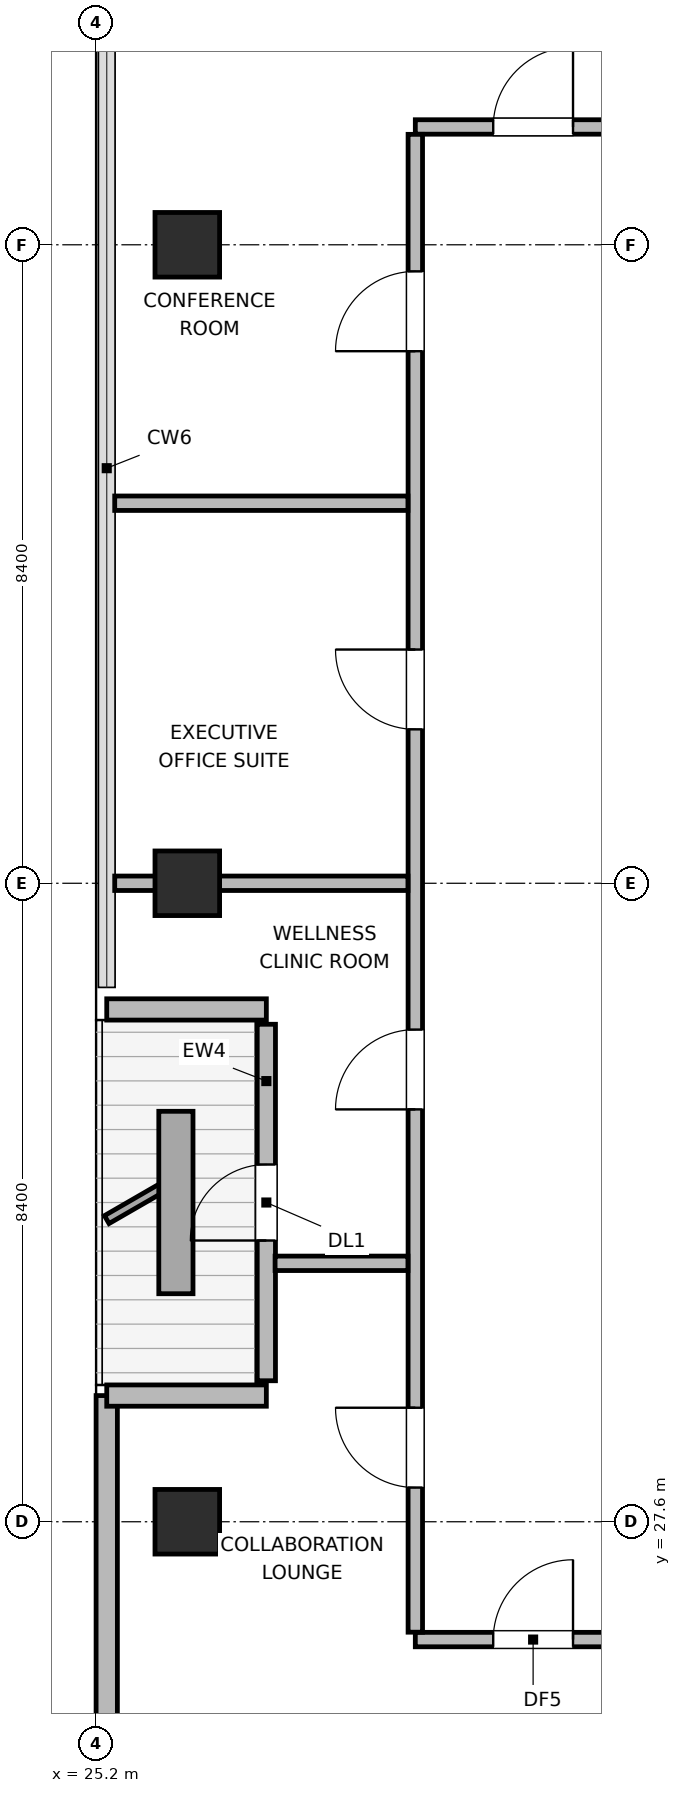
"""IFC4 building model, lengths in metres.
Left out: names, types, materials, properties, quantities, classifications, styles, units other than length and angle.
Written with IfcOpenShell. Run it as: python <this file> out.ifc"""

import sys

from ifc_helpers import new_model, si_unit, direction, frame, frame_2d, origin, origin_2d, place, context, subcontext, project, spatial, rectangle, extrude, element, fill, save


model = new_model("IFC4")
c1 = context("Model", 3, precision=1e-05, world=origin(), true_north=direction((0.0, 1.0)))
c2 = subcontext(c1, "Body", "Model", "MODEL_VIEW")
j1 = project(units=[si_unit("LENGTHUNIT", "METRE"), si_unit("PLANEANGLEUNIT", "RADIAN")], contexts=[c1])
p1 = place(None, origin())
s1 = spatial("IfcSite", under=j1, at=p1, CompositionType="ELEMENT")
p2 = place(p1, origin())
s2 = spatial("IfcBuilding", under=s1, at=p2, CompositionType="ELEMENT")
p3 = place(p2, frame((0.0, 0.0, 346.5)))
s3 = spatial("IfcBuildingStorey", under=s2, at=p3, CompositionType="ELEMENT", Elevation=346.5)
for number, where, z_axis, x_axis in (
    (1, (26.4, 27.6, 0.0), (0.0, 0.0, 1.0), (1.0, 0.0, 0.0)),
    (2, (26.4, 36.0, 0.0), (0.0, 0.0, 1.0), (1.0, 0.0, 0.0)),
    (3, (26.4, 44.4, 0.0), (0.0, 0.0, 1.0), (1.0, 0.0, 0.0)),
):
    element("IfcColumn", number, at=place(p3, frame(where, z_axis=z_axis, x_axis=x_axis)), inside=s3, PredefinedType="COLUMN", context=c2, shape_type="SweptSolid", body=[
        extrude(rectangle(XDim=0.85, YDim=0.85, at=origin_2d()), origin(), (0.0, 0.0, 1.0), 3.9),
    ])
p4 = place(p3, frame((25.34, 23.418, 0.0), z_axis=(0.0, 0.0, 1.0), x_axis=(0.0, 1.0, 0.0)))
e4 = element("IfcWall", 4, at=p4, inside=s3, PredefinedType="SOLIDWALL", context=c2, shape_type="SweptSolid", body=[
    extrude(rectangle(XDim=5.842, YDim=0.28, at=frame_2d((2.921, 0.0))), origin(), (0.0, 0.0, 1.0), 3.68),
])
p5 = place(p3, frame((25.34, 29.26, 0.0), z_axis=(0.0, 0.0, 1.0), x_axis=(1.0, 0.0, 0.0)))
e5 = element("IfcWall", 5, at=p5, inside=s3, PredefinedType="SOLIDWALL", context=c2, shape_type="SweptSolid", body=[
    extrude(rectangle(XDim=2.1, YDim=0.28, at=frame_2d((1.05, 0.0))), origin(), (0.0, 0.0, 1.0), 2.215),
])
p6 = place(p3, frame((27.44, 29.455, 0.0), z_axis=(0.0, 0.0, 1.0), x_axis=(0.0, 1.0, 0.0)))
e6 = element("IfcWall", 6, at=p6, inside=s3, PredefinedType="SOLIDWALL", context=c2, shape_type="SweptSolid", body=[
    extrude(rectangle(XDim=4.69, YDim=0.24, at=frame_2d((2.345, 0.0))), origin(), (0.0, 0.0, 1.0), 3.311),
])
p7 = place(p6, frame((1.845, 0.0, 0.0)))
e7 = element("IfcOpeningElement", 7, at=p7, cuts=e6, PredefinedType="OPENING", context=c2, shape_type="SweptSolid", body=[
    extrude(rectangle(XDim=1.0, YDim=2.02, at=frame_2d((0.5, 1.01))), frame((0.0, 0.13, 0.0), z_axis=(0.0, -1.0, 0.0), x_axis=(1.0, 0.0, 0.0)), (0.0, 0.0, 1.0), 0.26),
])
p8 = place(p3, frame((27.44, 34.34, 0.0), z_axis=(0.0, 0.0, 1.0), x_axis=(-1.0, 0.0, 0.0)))
e8 = element("IfcWall", 8, at=p8, inside=s3, PredefinedType="SOLIDWALL", context=c2, shape_type="SweptSolid", body=[
    extrude(rectangle(XDim=2.1, YDim=0.28, at=frame_2d((1.05, 0.0))), origin(), (0.0, 0.0, 1.0), 2.215),
])
p9 = place(p3, frame((29.4, 26.05, 0.0), z_axis=(0.0, 0.0, 1.0), x_axis=(1.0, 0.0, 0.0)))
e9 = element("IfcWall", 9, at=p9, inside=s3, PredefinedType="PLUMBINGWALL", context=c2, shape_type="SweptSolid", body=[
    extrude(rectangle(XDim=37.4, YDim=0.19, at=frame_2d((18.7, 0.0))), origin(), (0.0, 0.0, 1.0), 3.68),
])
p10 = place(p9, frame((1.025, 0.0, 0.0)))
e10 = element("IfcOpeningElement", 10, at=p10, cuts=e9, PredefinedType="OPENING", context=c2, shape_type="SweptSolid", body=[
    extrude(rectangle(XDim=1.05, YDim=2.04, at=frame_2d((0.525, 1.02))), frame((0.0, 0.105, 0.0), z_axis=(0.0, -1.0, 0.0), x_axis=(1.0, 0.0, 0.0)), (0.0, 0.0, 1.0), 0.21),
])
p11 = place(p9, frame((4.125, 0.0, 0.0)))
e11 = element("IfcOpeningElement", 11, at=p11, cuts=e9, PredefinedType="OPENING", context=c2, shape_type="SweptSolid", body=[
    extrude(rectangle(XDim=1.05, YDim=2.04, at=frame_2d((0.525, 1.02))), frame((0.0, 0.105, 0.0), z_axis=(0.0, -1.0, 0.0), x_axis=(1.0, 0.0, 0.0)), (0.0, 0.0, 1.0), 0.21),
])
p12 = place(p9, frame((7.325, 0.0, 0.0)))
e12 = element("IfcOpeningElement", 12, at=p12, cuts=e9, PredefinedType="OPENING", context=c2, shape_type="SweptSolid", body=[
    extrude(rectangle(XDim=1.05, YDim=2.04, at=frame_2d((0.525, 1.02))), frame((0.0, 0.105, 0.0), z_axis=(0.0, -1.0, 0.0), x_axis=(1.0, 0.0, 0.0)), (0.0, 0.0, 1.0), 0.21),
])
p13 = place(p9, frame((10.525, 0.0, 0.0)))
e13 = element("IfcOpeningElement", 13, at=p13, cuts=e9, PredefinedType="OPENING", context=c2, shape_type="SweptSolid", body=[
    extrude(rectangle(XDim=1.05, YDim=2.04, at=frame_2d((0.525, 1.02))), frame((0.0, 0.105, 0.0), z_axis=(0.0, -1.0, 0.0), x_axis=(1.0, 0.0, 0.0)), (0.0, 0.0, 1.0), 0.21),
])
p14 = place(p9, frame((14.525, 0.0, 0.0)))
e14 = element("IfcOpeningElement", 14, at=p14, cuts=e9, PredefinedType="OPENING", context=c2, shape_type="SweptSolid", body=[
    extrude(rectangle(XDim=1.05, YDim=2.04, at=frame_2d((0.525, 1.02))), frame((0.0, 0.105, 0.0), z_axis=(0.0, -1.0, 0.0), x_axis=(1.0, 0.0, 0.0)), (0.0, 0.0, 1.0), 0.21),
])
p15 = place(p9, frame((18.625, 0.0, 0.0)))
e15 = element("IfcOpeningElement", 15, at=p15, cuts=e9, PredefinedType="OPENING", context=c2, shape_type="SweptSolid", body=[
    extrude(rectangle(XDim=1.05, YDim=2.04, at=frame_2d((0.525, 1.02))), frame((0.0, 0.105, 0.0), z_axis=(0.0, -1.0, 0.0), x_axis=(1.0, 0.0, 0.0)), (0.0, 0.0, 1.0), 0.21),
])
p16 = place(p9, frame((22.025, 0.0, 0.0)))
e16 = element("IfcOpeningElement", 16, at=p16, cuts=e9, PredefinedType="OPENING", context=c2, shape_type="SweptSolid", body=[
    extrude(rectangle(XDim=1.05, YDim=2.04, at=frame_2d((0.525, 1.02))), frame((0.0, 0.105, 0.0), z_axis=(0.0, -1.0, 0.0), x_axis=(1.0, 0.0, 0.0)), (0.0, 0.0, 1.0), 0.21),
])
p17 = place(p9, frame((25.425, 0.0, 0.0)))
e17 = element("IfcOpeningElement", 17, at=p17, cuts=e9, PredefinedType="OPENING", context=c2, shape_type="SweptSolid", body=[
    extrude(rectangle(XDim=1.05, YDim=2.04, at=frame_2d((0.525, 1.02))), frame((0.0, 0.105, 0.0), z_axis=(0.0, -1.0, 0.0), x_axis=(1.0, 0.0, 0.0)), (0.0, 0.0, 1.0), 0.21),
])
p18 = place(p9, frame((28.825, 0.0, 0.0)))
e18 = element("IfcOpeningElement", 18, at=p18, cuts=e9, PredefinedType="OPENING", context=c2, shape_type="SweptSolid", body=[
    extrude(rectangle(XDim=1.05, YDim=2.04, at=frame_2d((0.525, 1.02))), frame((0.0, 0.105, 0.0), z_axis=(0.0, -1.0, 0.0), x_axis=(1.0, 0.0, 0.0)), (0.0, 0.0, 1.0), 0.21),
])
p19 = place(p9, frame((33.725, 0.0, 0.0)))
e19 = element("IfcOpeningElement", 19, at=p19, cuts=e9, PredefinedType="OPENING", context=c2, shape_type="SweptSolid", body=[
    extrude(rectangle(XDim=1.05, YDim=2.04, at=frame_2d((0.525, 1.02))), frame((0.0, 0.105, 0.0), z_axis=(0.0, -1.0, 0.0), x_axis=(1.0, 0.0, 0.0)), (0.0, 0.0, 1.0), 0.21),
])
p20 = place(p3, frame((29.4, 45.95, 0.0), z_axis=(0.0, 0.0, 1.0), x_axis=(1.0, 0.0, 0.0)))
e20 = element("IfcWall", 20, at=p20, inside=s3, PredefinedType="PLUMBINGWALL", context=c2, shape_type="SweptSolid", body=[
    extrude(rectangle(XDim=37.4, YDim=0.19, at=frame_2d((18.7, 0.0))), origin(), (0.0, 0.0, 1.0), 3.68),
])
p21 = place(p20, frame((1.025, 0.0, 0.0)))
e21 = element("IfcOpeningElement", 21, at=p21, cuts=e20, PredefinedType="OPENING", context=c2, shape_type="SweptSolid", body=[
    extrude(rectangle(XDim=1.05, YDim=2.04, at=frame_2d((0.525, 1.02))), frame((0.0, 0.105, 0.0), z_axis=(0.0, -1.0, 0.0), x_axis=(1.0, 0.0, 0.0)), (0.0, 0.0, 1.0), 0.21),
])
p22 = place(p20, frame((4.125, 0.0, 0.0)))
e22 = element("IfcOpeningElement", 22, at=p22, cuts=e20, PredefinedType="OPENING", context=c2, shape_type="SweptSolid", body=[
    extrude(rectangle(XDim=1.05, YDim=2.04, at=frame_2d((0.525, 1.02))), frame((0.0, 0.105, 0.0), z_axis=(0.0, -1.0, 0.0), x_axis=(1.0, 0.0, 0.0)), (0.0, 0.0, 1.0), 0.21),
])
p23 = place(p20, frame((7.325, 0.0, 0.0)))
e23 = element("IfcOpeningElement", 23, at=p23, cuts=e20, PredefinedType="OPENING", context=c2, shape_type="SweptSolid", body=[
    extrude(rectangle(XDim=1.05, YDim=2.04, at=frame_2d((0.525, 1.02))), frame((0.0, 0.105, 0.0), z_axis=(0.0, -1.0, 0.0), x_axis=(1.0, 0.0, 0.0)), (0.0, 0.0, 1.0), 0.21),
])
p24 = place(p20, frame((10.525, 0.0, 0.0)))
e24 = element("IfcOpeningElement", 24, at=p24, cuts=e20, PredefinedType="OPENING", context=c2, shape_type="SweptSolid", body=[
    extrude(rectangle(XDim=1.05, YDim=2.04, at=frame_2d((0.525, 1.02))), frame((0.0, 0.105, 0.0), z_axis=(0.0, -1.0, 0.0), x_axis=(1.0, 0.0, 0.0)), (0.0, 0.0, 1.0), 0.21),
])
p25 = place(p20, frame((13.925, 0.0, 0.0)))
e25 = element("IfcOpeningElement", 25, at=p25, cuts=e20, PredefinedType="OPENING", context=c2, shape_type="SweptSolid", body=[
    extrude(rectangle(XDim=1.05, YDim=2.04, at=frame_2d((0.525, 1.02))), frame((0.0, 0.105, 0.0), z_axis=(0.0, -1.0, 0.0), x_axis=(1.0, 0.0, 0.0)), (0.0, 0.0, 1.0), 0.21),
])
p26 = place(p20, frame((20.125, 0.0, 0.0)))
e26 = element("IfcOpeningElement", 26, at=p26, cuts=e20, PredefinedType="OPENING", context=c2, shape_type="SweptSolid", body=[
    extrude(rectangle(XDim=1.05, YDim=2.04, at=frame_2d((0.525, 1.02))), frame((0.0, 0.105, 0.0), z_axis=(0.0, -1.0, 0.0), x_axis=(1.0, 0.0, 0.0)), (0.0, 0.0, 1.0), 0.21),
])
p27 = place(p20, frame((26.125, 0.0, 0.0)))
e27 = element("IfcOpeningElement", 27, at=p27, cuts=e20, PredefinedType="OPENING", context=c2, shape_type="SweptSolid", body=[
    extrude(rectangle(XDim=1.05, YDim=2.04, at=frame_2d((0.525, 1.02))), frame((0.0, 0.105, 0.0), z_axis=(0.0, -1.0, 0.0), x_axis=(1.0, 0.0, 0.0)), (0.0, 0.0, 1.0), 0.21),
])
p28 = place(p20, frame((29.325, 0.0, 0.0)))
e28 = element("IfcOpeningElement", 28, at=p28, cuts=e20, PredefinedType="OPENING", context=c2, shape_type="SweptSolid", body=[
    extrude(rectangle(XDim=1.05, YDim=2.04, at=frame_2d((0.525, 1.02))), frame((0.0, 0.105, 0.0), z_axis=(0.0, -1.0, 0.0), x_axis=(1.0, 0.0, 0.0)), (0.0, 0.0, 1.0), 0.21),
])
p29 = place(p20, frame((33.925, 0.0, 0.0)))
e29 = element("IfcOpeningElement", 29, at=p29, cuts=e20, PredefinedType="OPENING", context=c2, shape_type="SweptSolid", body=[
    extrude(rectangle(XDim=1.05, YDim=2.04, at=frame_2d((0.525, 1.02))), frame((0.0, 0.105, 0.0), z_axis=(0.0, -1.0, 0.0), x_axis=(1.0, 0.0, 0.0)), (0.0, 0.0, 1.0), 0.21),
])
p30 = place(p3, frame((29.4, 26.147, 0.0), z_axis=(0.0, 0.0, 1.0), x_axis=(0.0, 1.0, 0.0)))
e30 = element("IfcWall", 30, at=p30, inside=s3, PredefinedType="PLUMBINGWALL", context=c2, shape_type="SweptSolid", body=[
    extrude(rectangle(XDim=19.706, YDim=0.19, at=frame_2d((9.853, 0.0))), origin(), (0.0, 0.0, 1.0), 3.68),
])
p31 = place(p30, frame((1.903, 0.0, 0.0)))
e31 = element("IfcOpeningElement", 31, at=p31, cuts=e30, PredefinedType="OPENING", context=c2, shape_type="SweptSolid", body=[
    extrude(rectangle(XDim=1.05, YDim=2.04, at=frame_2d((0.525, 1.02))), frame((0.0, 0.105, 0.0), z_axis=(0.0, -1.0, 0.0), x_axis=(1.0, 0.0, 0.0)), (0.0, 0.0, 1.0), 0.21),
])
p32 = place(p30, frame((6.878, 0.0, 0.0)))
e32 = element("IfcOpeningElement", 32, at=p32, cuts=e30, PredefinedType="OPENING", context=c2, shape_type="SweptSolid", body=[
    extrude(rectangle(XDim=1.05, YDim=2.04, at=frame_2d((0.525, 1.02))), frame((0.0, 0.105, 0.0), z_axis=(0.0, -1.0, 0.0), x_axis=(1.0, 0.0, 0.0)), (0.0, 0.0, 1.0), 0.21),
])
p33 = place(p30, frame((11.878, 0.0, 0.0)))
e33 = element("IfcOpeningElement", 33, at=p33, cuts=e30, PredefinedType="OPENING", context=c2, shape_type="SweptSolid", body=[
    extrude(rectangle(XDim=1.05, YDim=2.04, at=frame_2d((0.525, 1.02))), frame((0.0, 0.105, 0.0), z_axis=(0.0, -1.0, 0.0), x_axis=(1.0, 0.0, 0.0)), (0.0, 0.0, 1.0), 0.21),
])
p34 = place(p30, frame((16.853, 0.0, 0.0)))
e34 = element("IfcOpeningElement", 34, at=p34, cuts=e30, PredefinedType="OPENING", context=c2, shape_type="SweptSolid", body=[
    extrude(rectangle(XDim=1.05, YDim=2.04, at=frame_2d((0.525, 1.02))), frame((0.0, 0.105, 0.0), z_axis=(0.0, -1.0, 0.0), x_axis=(1.0, 0.0, 0.0)), (0.0, 0.0, 1.0), 0.21),
])
p35 = place(p3, frame((27.555, 31.0, 0.0), z_axis=(0.0, 0.0, 1.0), x_axis=(1.0, 0.0, 0.0)))
e35 = element("IfcWall", 35, at=p35, inside=s3, PredefinedType="PLUMBINGWALL", context=c2, shape_type="SweptSolid", body=[
    extrude(rectangle(XDim=1.748, YDim=0.19, at=frame_2d((0.874, 0.0))), origin(), (0.0, 0.0, 1.0), 3.68),
])
p36 = place(p3, frame((25.445, 36.0, 0.0), z_axis=(0.0, 0.0, 1.0), x_axis=(1.0, 0.0, 0.0)))
e36 = element("IfcWall", 36, at=p36, inside=s3, PredefinedType="PLUMBINGWALL", context=c2, shape_type="SweptSolid", body=[
    extrude(rectangle(XDim=3.858, YDim=0.19, at=frame_2d((1.929, 0.0))), origin(), (0.0, 0.0, 1.0), 3.054),
])
p37 = place(p3, frame((25.445, 41.0, 0.0), z_axis=(0.0, 0.0, 1.0), x_axis=(1.0, 0.0, 0.0)))
e37 = element("IfcWall", 37, at=p37, inside=s3, PredefinedType="PLUMBINGWALL", context=c2, shape_type="SweptSolid", body=[
    extrude(rectangle(XDim=3.858, YDim=0.19, at=frame_2d((1.929, 0.0))), origin(), (0.0, 0.0, 1.0), 3.68),
])
p38 = place(p7, origin())
e38 = element("IfcDoor", 38, at=p38, inside=s3, OperationType="SINGLE_SWING_LEFT", PredefinedType="DOOR", context=c2, shape_type="SweptSolid", body=[
    extrude(rectangle(XDim=1.0, YDim=2.02, at=frame_2d((0.5, 1.01))), frame((0.0, 0.025, 0.0), z_axis=(0.0, -1.0, 0.0), x_axis=(1.0, 0.0, 0.0)), (0.0, 0.0, 1.0), 0.05),
])
fill(e7, e38)
p39 = place(p10, origin())
e39 = element("IfcDoor", 39, at=p39, inside=s3, OperationType="SINGLE_SWING_RIGHT", PredefinedType="DOOR", context=c2, shape_type="SweptSolid", body=[
    extrude(rectangle(XDim=1.05, YDim=2.04, at=frame_2d((0.525, 1.02))), frame((0.0, 0.025, 0.0), z_axis=(0.0, -1.0, 0.0), x_axis=(1.0, 0.0, 0.0)), (0.0, 0.0, 1.0), 0.05),
])
fill(e10, e39)
p40 = place(p21, origin())
e40 = element("IfcDoor", 40, at=p40, inside=s3, OperationType="SINGLE_SWING_RIGHT", PredefinedType="DOOR", context=c2, shape_type="SweptSolid", body=[
    extrude(rectangle(XDim=1.05, YDim=2.04, at=frame_2d((0.525, 1.02))), frame((0.0, 0.025, 0.0), z_axis=(0.0, -1.0, 0.0), x_axis=(1.0, 0.0, 0.0)), (0.0, 0.0, 1.0), 0.05),
])
fill(e21, e40)
p41 = place(p31, origin())
e41 = element("IfcDoor", 41, at=p41, inside=s3, OperationType="SINGLE_SWING_RIGHT", PredefinedType="DOOR", context=c2, shape_type="SweptSolid", body=[
    extrude(rectangle(XDim=1.05, YDim=2.04, at=frame_2d((0.525, 1.02))), frame((0.0, 0.025, 0.0), z_axis=(0.0, -1.0, 0.0), x_axis=(1.0, 0.0, 0.0)), (0.0, 0.0, 1.0), 0.05),
])
fill(e31, e41)
p42 = place(p32, origin())
e42 = element("IfcDoor", 42, at=p42, inside=s3, OperationType="SINGLE_SWING_LEFT", PredefinedType="DOOR", context=c2, shape_type="SweptSolid", body=[
    extrude(rectangle(XDim=1.05, YDim=2.04, at=frame_2d((0.525, 1.02))), frame((0.0, 0.025, 0.0), z_axis=(0.0, -1.0, 0.0), x_axis=(1.0, 0.0, 0.0)), (0.0, 0.0, 1.0), 0.05),
])
fill(e32, e42)
p43 = place(p33, origin())
e43 = element("IfcDoor", 43, at=p43, inside=s3, OperationType="SINGLE_SWING_RIGHT", PredefinedType="DOOR", context=c2, shape_type="SweptSolid", body=[
    extrude(rectangle(XDim=1.05, YDim=2.04, at=frame_2d((0.525, 1.02))), frame((0.0, 0.025, 0.0), z_axis=(0.0, -1.0, 0.0), x_axis=(1.0, 0.0, 0.0)), (0.0, 0.0, 1.0), 0.05),
])
fill(e33, e43)
p44 = place(p34, origin())
e44 = element("IfcDoor", 44, at=p44, inside=s3, OperationType="SINGLE_SWING_LEFT", PredefinedType="DOOR", context=c2, shape_type="SweptSolid", body=[
    extrude(rectangle(XDim=1.05, YDim=2.04, at=frame_2d((0.525, 1.02))), frame((0.0, 0.025, 0.0), z_axis=(0.0, -1.0, 0.0), x_axis=(1.0, 0.0, 0.0)), (0.0, 0.0, 1.0), 0.05),
])
fill(e34, e44)
save(model, sys.argv[1])
